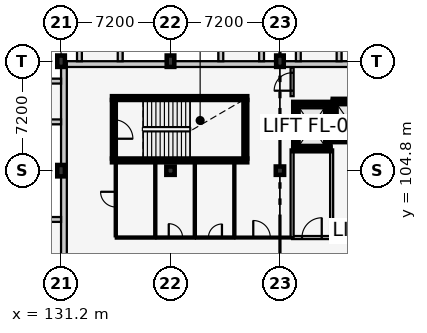
"""IFC4 building model, lengths in metres.
Left out: names, types, materials, properties, quantities, classifications, styles, units other than length and angle.
Written with IfcOpenShell. Run it as: python <this file> out.ifc"""

import sys

from ifc_helpers import new_model, si_unit, direction, frame, frame_2d, origin, origin_2d, place, context, subcontext, project, spatial, rectangle, extrude, element, fill, save


model = new_model("IFC4")
c1 = context("Model", 3, precision=1e-05, world=origin(), true_north=direction((0.0, 1.0)))
c2 = subcontext(c1, "Body", "Model", "MODEL_VIEW")
j1 = project(units=[si_unit("LENGTHUNIT", "METRE"), si_unit("PLANEANGLEUNIT", "RADIAN")], contexts=[c1])
p1 = place(None, origin())
s1 = spatial("IfcSite", under=j1, at=p1, CompositionType="ELEMENT")
p2 = place(p1, origin())
s2 = spatial("IfcBuilding", under=s1, at=p2, CompositionType="ELEMENT")
p3 = place(p2, frame((0.0, 0.0, 21.9)))
s3 = spatial("IfcBuildingStorey", under=s2, at=p3, CompositionType="ELEMENT", Elevation=21.9)
for number, where, z_axis, x_axis in (
    (1, (131.2, 104.8, 0.0), (0.0, 0.0, 1.0), (1.0, 0.0, 0.0)),
    (2, (131.2, 112.0, 0.0), (0.0, 0.0, 1.0), (1.0, 0.0, 0.0)),
):
    element("IfcColumn", number, at=place(p3, frame(where, z_axis=z_axis, x_axis=x_axis)), inside=s3, PredefinedType="COLUMN", context=c2, shape_type="SweptSolid", body=[
        extrude(rectangle(XDim=0.5, YDim=0.75, at=origin_2d()), origin(), (0.0, 0.0, 1.0), 3.9),
    ])
p4 = place(p3, frame((138.4, 104.8, 0.0), z_axis=(0.0, 0.0, 1.0), x_axis=(1.0, 0.0, 0.0)))
e3 = element("IfcColumn", 3, at=p4, inside=s3, PredefinedType="COLUMN", context=c2, shape_type="SweptSolid", body=[
    extrude(rectangle(XDim=0.55, YDim=0.55, at=origin_2d()), origin(), (0.0, 0.0, 1.0), 3.9),
])
p5 = place(p3, frame((138.4, 112.0, 0.0), z_axis=(0.0, 0.0, 1.0), x_axis=(1.0, 0.0, 0.0)))
e4 = element("IfcColumn", 4, at=p5, inside=s3, PredefinedType="COLUMN", context=c2, shape_type="SweptSolid", body=[
    extrude(rectangle(XDim=0.5, YDim=0.75, at=origin_2d()), origin(), (0.0, 0.0, 1.0), 3.9),
])
p6 = place(p3, frame((145.6, 104.8, 0.0), z_axis=(0.0, 0.0, 1.0), x_axis=(1.0, 0.0, 0.0)))
e5 = element("IfcColumn", 5, at=p6, inside=s3, PredefinedType="COLUMN", context=c2, shape_type="SweptSolid", body=[
    extrude(rectangle(XDim=0.55, YDim=0.55, at=origin_2d()), origin(), (0.0, 0.0, 1.0), 3.9),
])
p7 = place(p3, frame((145.6, 112.0, 0.0), z_axis=(0.0, 0.0, 1.0), x_axis=(1.0, 0.0, 0.0)))
e6 = element("IfcColumn", 6, at=p7, inside=s3, PredefinedType="COLUMN", context=c2, shape_type="SweptSolid", body=[
    extrude(rectangle(XDim=0.5, YDim=0.75, at=origin_2d()), origin(), (0.0, 0.0, 1.0), 3.9),
])
p8 = place(p3, frame((131.2, 111.81, 0.0), z_axis=(0.0, 0.0, 1.0), x_axis=(1.0, 0.0, 0.0)))
e7 = element("IfcWall", 7, at=p8, inside=s3, PredefinedType="SOLIDWALL", context=c2, shape_type="SweptSolid", body=[
    extrude(rectangle(XDim=28.8, YDim=0.38, at=frame_2d((14.4, 0.0))), origin(), (0.0, 0.0, 1.0), 2.955),
])
p9 = place(p3, frame((132.41, 112.0, 0.0), z_axis=(0.0, 0.0, 1.0), x_axis=(0.0, 1.0, 0.0)))
e8 = element("IfcWall", 8, at=p9, inside=s3, PredefinedType="SOLIDWALL", context=c2, shape_type="SweptSolid", body=[
    extrude(rectangle(XDim=1.793, YDim=0.32, at=frame_2d((0.896, 0.0))), origin(), (0.0, 0.0, 1.0), 3.64),
])
for number, where, z_axis, x_axis in (
    (9, (135.09, 112.0, 0.0), (0.0, 0.0, 1.0), (0.0, 1.0, 0.0)),
    (10, (141.71, 112.0, 0.0), (0.0, 0.0, 1.0), (0.0, 1.0, 0.0)),
):
    element("IfcWall", number, at=place(p3, frame(where, z_axis=z_axis, x_axis=x_axis)), inside=s3, PredefinedType="SOLIDWALL", context=c2, shape_type="SweptSolid", body=[
        extrude(rectangle(XDim=1.35, YDim=0.32, at=frame_2d((0.675, 0.0))), origin(), (0.0, 0.0, 1.0), 3.64),
    ])
for number, where, z_axis, x_axis in (
    (11, (144.39, 112.0, 0.0), (0.0, 0.0, 1.0), (0.0, 1.0, 0.0)),
    (12, (146.81, 112.0, 0.0), (0.0, 0.0, 1.0), (0.0, 1.0, 0.0)),
):
    element("IfcWall", number, at=place(p3, frame(where, z_axis=z_axis, x_axis=x_axis)), inside=s3, PredefinedType="SOLIDWALL", context=c2, shape_type="SweptSolid", body=[
        extrude(rectangle(XDim=1.793, YDim=0.32, at=frame_2d((0.896, 0.0))), origin(), (0.0, 0.0, 1.0), 3.64),
    ])
p10 = place(p3, frame((149.49, 112.0, 0.0), z_axis=(0.0, 0.0, 1.0), x_axis=(0.0, 1.0, 0.0)))
e13 = element("IfcWall", 13, at=p10, inside=s3, PredefinedType="SOLIDWALL", context=c2, shape_type="SweptSolid", body=[
    extrude(rectangle(XDim=1.35, YDim=0.32, at=frame_2d((0.675, 0.0))), origin(), (0.0, 0.0, 1.0), 3.64),
])
p11 = place(p3, frame((131.39, 83.2, 0.0), z_axis=(0.0, 0.0, 1.0), x_axis=(0.0, 1.0, 0.0)))
e14 = element("IfcWall", 14, at=p11, inside=s3, PredefinedType="SOLIDWALL", context=c2, shape_type="SweptSolid", body=[
    extrude(rectangle(XDim=28.8, YDim=0.38, at=frame_2d((14.4, 0.0))), origin(), (0.0, 0.0, 1.0), 2.915),
])
for number, where, z_axis, x_axis in (
    (15, (131.2, 101.59, 0.0), (0.0, 0.0, 1.0), (-1.0, 0.0, 0.0)),
    (16, (131.2, 108.01, 0.0), (0.0, 0.0, 1.0), (-1.0, 0.0, 0.0)),
):
    element("IfcWall", number, at=place(p3, frame(where, z_axis=z_axis, x_axis=x_axis)), inside=s3, PredefinedType="SOLIDWALL", context=c2, shape_type="SweptSolid", body=[
        extrude(rectangle(XDim=1.35, YDim=0.32, at=frame_2d((0.675, 0.0))), origin(), (0.0, 0.0, 1.0), 3.64),
    ])
p12 = place(p3, frame((131.2, 110.69, 0.0), z_axis=(0.0, 0.0, 1.0), x_axis=(-1.0, 0.0, 0.0)))
e17 = element("IfcWall", 17, at=p12, inside=s3, PredefinedType="SOLIDWALL", context=c2, shape_type="SweptSolid", body=[
    extrude(rectangle(XDim=1.793, YDim=0.32, at=frame_2d((0.896, 0.0))), origin(), (0.0, 0.0, 1.0), 3.64),
])
for number, where, z_axis, x_axis in (
    (18, (134.55, 105.475, 0.0), (0.0, 0.0, 1.0), (1.0, 0.0, 0.0)),
    (19, (143.45, 109.575, 0.0), (0.0, 0.0, 1.0), (-1.0, 0.0, 0.0)),
):
    element("IfcWall", number, at=place(p3, frame(where, z_axis=z_axis, x_axis=x_axis)), inside=s3, PredefinedType="SHEAR", context=c2, shape_type="SweptSolid", body=[
        extrude(rectangle(XDim=8.9, YDim=0.25, at=frame_2d((4.45, 0.0))), origin(), (0.0, 0.0, 1.0), 3.66),
    ])
p13 = place(p3, frame((134.675, 109.45, 0.0), z_axis=(0.0, 0.0, 1.0), x_axis=(0.0, -1.0, 0.0)))
e20 = element("IfcWall", 20, at=p13, inside=s3, PredefinedType="SHEAR", context=c2, shape_type="SweptSolid", body=[
    extrude(rectangle(XDim=3.85, YDim=0.25, at=frame_2d((1.925, 0.0))), origin(), (0.0, 0.0, 1.0), 3.66),
])
p14 = place(p13, frame((1.3, 0.0, 0.0)))
e21 = element("IfcOpeningElement", 21, at=p14, cuts=e20, PredefinedType="OPENING", context=c2, shape_type="SweptSolid", body=[
    extrude(rectangle(XDim=1.25, YDim=2.15, at=frame_2d((0.625, 1.075))), frame((0.0, 0.137, 0.0), z_axis=(0.0, -1.0, 0.0), x_axis=(1.0, 0.0, 0.0)), (0.0, 0.0, 1.0), 0.274),
])
p15 = place(p3, frame((143.325, 105.6, 0.0), z_axis=(0.0, 0.0, 1.0), x_axis=(0.0, 1.0, 0.0)))
e22 = element("IfcWall", 22, at=p15, inside=s3, PredefinedType="SHEAR", context=c2, shape_type="SweptSolid", body=[
    extrude(rectangle(XDim=3.85, YDim=0.25, at=frame_2d((1.925, 0.0))), origin(), (0.0, 0.0, 1.0), 3.66),
])
p16 = place(p3, frame((146.475, 106.2, 0.0), z_axis=(0.0, 0.0, 1.0), x_axis=(1.0, 0.0, 0.0)))
e23 = element("IfcWall", 23, at=p16, inside=s3, PredefinedType="SHEAR", context=c2, shape_type="SweptSolid", body=[
    extrude(rectangle(XDim=2.45, YDim=0.25, at=frame_2d((1.225, 0.0))), origin(), (0.0, 0.0, 1.0), 3.66),
])
p17 = place(p16, frame((0.675, 0.0, 0.0)))
e24 = element("IfcOpeningElement", 24, at=p17, cuts=e23, PredefinedType="OPENING", context=c2, shape_type="SweptSolid", body=[
    extrude(rectangle(XDim=1.1, YDim=2.15, at=frame_2d((0.55, 1.075))), frame((0.0, 0.137, 0.0), z_axis=(0.0, -1.0, 0.0), x_axis=(1.0, 0.0, 0.0)), (0.0, 0.0, 1.0), 0.274),
])
p18 = place(p3, frame((148.925, 109.2, 0.0), z_axis=(0.0, 0.0, 1.0), x_axis=(-1.0, 0.0, 0.0)))
e25 = element("IfcWall", 25, at=p18, inside=s3, PredefinedType="SHEAR", context=c2, shape_type="SweptSolid", body=[
    extrude(rectangle(XDim=2.45, YDim=0.25, at=frame_2d((1.225, 0.0))), origin(), (0.0, 0.0, 1.0), 3.66),
])
for number, where, z_axis, x_axis in (
    (26, (146.6, 109.2, 0.0), (0.0, 0.0, 1.0), (0.0, -1.0, 0.0)),
    (27, (148.8, 106.2, 0.0), (0.0, 0.0, 1.0), (0.0, 1.0, 0.0)),
):
    element("IfcWall", number, at=place(p3, frame(where, z_axis=z_axis, x_axis=x_axis)), inside=s3, PredefinedType="SHEAR", context=c2, shape_type="SweptSolid", body=[
        extrude(rectangle(XDim=3.0, YDim=0.25, at=frame_2d((1.5, 0.0))), origin(), (0.0, 0.0, 1.0), 3.66),
    ])
p19 = place(p3, frame((146.4, 100.4, 0.0), z_axis=(0.0, 0.0, 1.0), x_axis=(1.0, 0.0, 0.0)))
e28 = element("IfcWall", 28, at=p19, inside=s3, PredefinedType="PARTITIONING", context=c2, shape_type="SweptSolid", body=[
    extrude(rectangle(XDim=2.6, YDim=0.2, at=frame_2d((1.3, 0.0))), origin(), (0.0, 0.0, 1.0), 3.66),
])
p20 = place(p19, frame((0.65, 0.0, 0.0)))
e29 = element("IfcOpeningElement", 29, at=p20, cuts=e28, PredefinedType="OPENING", context=c2, shape_type="SweptSolid", body=[
    extrude(rectangle(XDim=1.3, YDim=2.2, at=frame_2d((0.65, 1.1))), frame((0.0, 0.112, 0.0), z_axis=(0.0, -1.0, 0.0), x_axis=(1.0, 0.0, 0.0)), (0.0, 0.0, 1.0), 0.224),
])
p21 = place(p3, frame((146.4, 106.2, 0.0), z_axis=(0.0, 0.0, 1.0), x_axis=(0.0, -1.0, 0.0)))
e30 = element("IfcWall", 30, at=p21, inside=s3, PredefinedType="PARTITIONING", context=c2, shape_type="SweptSolid", body=[
    extrude(rectangle(XDim=5.8, YDim=0.2, at=frame_2d((2.9, 0.0))), origin(), (0.0, 0.0, 1.0), 3.66),
])
p22 = place(p3, frame((149.0, 100.4, 0.0), z_axis=(0.0, 0.0, 1.0), x_axis=(0.0, 1.0, 0.0)))
e31 = element("IfcWall", 31, at=p22, inside=s3, PredefinedType="PARTITIONING", context=c2, shape_type="SweptSolid", body=[
    extrude(rectangle(XDim=5.8, YDim=0.2, at=frame_2d((2.9, 0.0))), origin(), (0.0, 0.0, 1.0), 3.335),
])
p23 = place(p3, frame((149.075, 106.8, 0.0), z_axis=(0.0, 0.0, 1.0), x_axis=(1.0, 0.0, 0.0)))
e32 = element("IfcWall", 32, at=p23, inside=s3, PredefinedType="SHEAR", context=c2, shape_type="SweptSolid", body=[
    extrude(rectangle(XDim=2.05, YDim=0.25, at=frame_2d((1.025, 0.0))), origin(), (0.0, 0.0, 1.0), 3.66),
])
p24 = place(p23, frame((0.525, 0.0, 0.0)))
e33 = element("IfcOpeningElement", 33, at=p24, cuts=e32, PredefinedType="OPENING", context=c2, shape_type="SweptSolid", body=[
    extrude(rectangle(XDim=1.0, YDim=2.15, at=frame_2d((0.5, 1.075))), frame((0.0, 0.137, 0.0), z_axis=(0.0, -1.0, 0.0), x_axis=(1.0, 0.0, 0.0)), (0.0, 0.0, 1.0), 0.274),
])
p25 = place(p3, frame((151.125, 109.4, 0.0), z_axis=(0.0, 0.0, 1.0), x_axis=(-1.0, 0.0, 0.0)))
e34 = element("IfcWall", 34, at=p25, inside=s3, PredefinedType="SHEAR", context=c2, shape_type="SweptSolid", body=[
    extrude(rectangle(XDim=2.05, YDim=0.25, at=frame_2d((1.025, 0.0))), origin(), (0.0, 0.0, 1.0), 3.66),
])
p26 = place(p3, frame((149.2, 109.4, 0.0), z_axis=(0.0, 0.0, 1.0), x_axis=(0.0, -1.0, 0.0)))
e35 = element("IfcWall", 35, at=p26, inside=s3, PredefinedType="SHEAR", context=c2, shape_type="SweptSolid", body=[
    extrude(rectangle(XDim=2.6, YDim=0.25, at=frame_2d((1.3, 0.0))), origin(), (0.0, 0.0, 1.0), 3.66),
])
p27 = place(p3, frame((134.8, 100.4, 0.0), z_axis=(0.0, 0.0, 1.0), x_axis=(1.0, 0.0, 0.0)))
e36 = element("IfcWall", 36, at=p27, inside=s3, PredefinedType="PARTITIONING", context=c2, shape_type="SweptSolid", body=[
    extrude(rectangle(XDim=2.6, YDim=0.14, at=frame_2d((1.3, 0.0))), origin(), (0.0, 0.0, 1.0), 3.66),
])
p28 = place(p3, frame((134.8, 100.48, 0.0), z_axis=(0.0, 0.0, 1.0), x_axis=(0.0, 1.0, 0.0)))
e37 = element("IfcWall", 37, at=p28, inside=s3, PredefinedType="PARTITIONING", context=c2, shape_type="SweptSolid", body=[
    extrude(rectangle(XDim=4.86, YDim=0.14, at=frame_2d((2.43, 0.0))), origin(), (0.0, 0.0, 1.0), 3.275),
])
p29 = place(p28, frame((1.93, 0.0, 0.0)))
e38 = element("IfcOpeningElement", 38, at=p29, cuts=e37, PredefinedType="OPENING", context=c2, shape_type="SweptSolid", body=[
    extrude(rectangle(XDim=1.0, YDim=2.1, at=frame_2d((0.5, 1.05))), frame((0.0, 0.082, 0.0), z_axis=(0.0, -1.0, 0.0), x_axis=(1.0, 0.0, 0.0)), (0.0, 0.0, 1.0), 0.164),
])
p30 = place(p3, frame((137.4, 100.48, 0.0), z_axis=(0.0, 0.0, 1.0), x_axis=(0.0, 1.0, 0.0)))
e39 = element("IfcWall", 39, at=p30, inside=s3, PredefinedType="PARTITIONING", context=c2, shape_type="SweptSolid", body=[
    extrude(rectangle(XDim=4.86, YDim=0.14, at=frame_2d((2.43, 0.0))), origin(), (0.0, 0.0, 1.0), 3.66),
])
p31 = place(p3, frame((137.48, 100.4, 0.0), z_axis=(0.0, 0.0, 1.0), x_axis=(1.0, 0.0, 0.0)))
e40 = element("IfcWall", 40, at=p31, inside=s3, PredefinedType="PARTITIONING", context=c2, shape_type="SweptSolid", body=[
    extrude(rectangle(XDim=2.52, YDim=0.14, at=frame_2d((1.26, 0.0))), origin(), (0.0, 0.0, 1.0), 3.66),
])
p32 = place(p31, frame((0.805, 0.0, 0.0)))
e41 = element("IfcOpeningElement", 41, at=p32, cuts=e40, PredefinedType="OPENING", context=c2, shape_type="SweptSolid", body=[
    extrude(rectangle(XDim=0.91, YDim=2.06, at=frame_2d((0.455, 1.03))), frame((0.0, 0.082, 0.0), z_axis=(0.0, -1.0, 0.0), x_axis=(1.0, 0.0, 0.0)), (0.0, 0.0, 1.0), 0.164),
])
p33 = place(p3, frame((140.0, 100.48, 0.0), z_axis=(0.0, 0.0, 1.0), x_axis=(0.0, 1.0, 0.0)))
e42 = element("IfcWall", 42, at=p33, inside=s3, PredefinedType="PARTITIONING", context=c2, shape_type="SweptSolid", body=[
    extrude(rectangle(XDim=4.86, YDim=0.14, at=frame_2d((2.43, 0.0))), origin(), (0.0, 0.0, 1.0), 3.66),
])
p34 = place(p3, frame((140.08, 100.4, 0.0), z_axis=(0.0, 0.0, 1.0), x_axis=(1.0, 0.0, 0.0)))
e43 = element("IfcWall", 43, at=p34, inside=s3, PredefinedType="PARTITIONING", context=c2, shape_type="SweptSolid", body=[
    extrude(rectangle(XDim=2.52, YDim=0.14, at=frame_2d((1.26, 0.0))), origin(), (0.0, 0.0, 1.0), 3.66),
])
p35 = place(p34, frame((0.815, 0.0, 0.0)))
e44 = element("IfcOpeningElement", 44, at=p35, cuts=e43, PredefinedType="OPENING", context=c2, shape_type="SweptSolid", body=[
    extrude(rectangle(XDim=0.89, YDim=2.05, at=frame_2d((0.445, 1.025))), frame((0.0, 0.082, 0.0), z_axis=(0.0, -1.0, 0.0), x_axis=(1.0, 0.0, 0.0)), (0.0, 0.0, 1.0), 0.164),
])
p36 = place(p3, frame((142.6, 100.48, 0.0), z_axis=(0.0, 0.0, 1.0), x_axis=(0.0, 1.0, 0.0)))
e45 = element("IfcWall", 45, at=p36, inside=s3, PredefinedType="PARTITIONING", context=c2, shape_type="SweptSolid", body=[
    extrude(rectangle(XDim=4.86, YDim=0.14, at=frame_2d((2.43, 0.0))), origin(), (0.0, 0.0, 1.0), 3.66),
])
p37 = place(p3, frame((142.68, 100.4, 0.0), z_axis=(0.0, 0.0, 1.0), x_axis=(1.0, 0.0, 0.0)))
e46 = element("IfcWall", 46, at=p37, inside=s3, PredefinedType="PARTITIONING", context=c2, shape_type="SweptSolid", body=[
    extrude(rectangle(XDim=3.61, YDim=0.125, at=frame_2d((1.805, 0.0))), origin(), (0.0, 0.0, 1.0), 3.66),
])
p38 = place(p37, frame((1.165, 0.0, 0.0)))
e47 = element("IfcOpeningElement", 47, at=p38, cuts=e46, PredefinedType="OPENING", context=c2, shape_type="SweptSolid", body=[
    extrude(rectangle(XDim=1.12, YDim=2.15, at=frame_2d((0.56, 1.075))), frame((0.0, 0.074, 0.0), z_axis=(0.0, -1.0, 0.0), x_axis=(1.0, 0.0, 0.0)), (0.0, 0.0, 1.0), 0.149),
])
p39 = place(p3, frame((146.4, 109.7, 0.0), z_axis=(0.0, 0.0, 1.0), x_axis=(0.0, 1.0, 0.0)))
e48 = element("IfcWall", 48, at=p39, inside=s3, PredefinedType="PARTITIONING", context=c2, shape_type="SweptSolid", body=[
    extrude(rectangle(XDim=1.9, YDim=0.2, at=frame_2d((0.95, 0.0))), origin(), (0.0, 0.0, 1.0), 3.66),
])
p40 = place(p39, frame((0.36, 0.0, 0.0)))
e49 = element("IfcOpeningElement", 49, at=p40, cuts=e48, PredefinedType="OPENING", context=c2, shape_type="SweptSolid", body=[
    extrude(rectangle(XDim=1.18, YDim=2.2, at=frame_2d((0.59, 1.1))), frame((0.0, 0.112, 0.0), z_axis=(0.0, -1.0, 0.0), x_axis=(1.0, 0.0, 0.0)), (0.0, 0.0, 1.0), 0.224),
])
p41 = place(p14, origin())
e50 = element("IfcDoor", 50, at=p41, inside=s3, OperationType="SINGLE_SWING_RIGHT", PredefinedType="DOOR", context=c2, shape_type="SweptSolid", body=[
    extrude(rectangle(XDim=1.25, YDim=2.15, at=frame_2d((0.625, 1.075))), frame((0.0, 0.025, 0.0), z_axis=(0.0, -1.0, 0.0), x_axis=(1.0, 0.0, 0.0)), (0.0, 0.0, 1.0), 0.05),
])
fill(e21, e50)
p42 = place(p17, origin())
e51 = element("IfcDoor", 51, at=p42, inside=s3, OperationType="SLIDING_TO_LEFT", PredefinedType="DOOR", context=c2, shape_type="SweptSolid", body=[
    extrude(rectangle(XDim=1.1, YDim=2.15, at=frame_2d((0.55, 1.075))), frame((0.0, 0.025, 0.0), z_axis=(0.0, -1.0, 0.0), x_axis=(1.0, 0.0, 0.0)), (0.0, 0.0, 1.0), 0.05),
])
fill(e24, e51)
p43 = place(p20, origin())
e52 = element("IfcDoor", 52, at=p43, inside=s3, OperationType="SINGLE_SWING_RIGHT", PredefinedType="DOOR", context=c2, shape_type="SweptSolid", body=[
    extrude(rectangle(XDim=1.3, YDim=2.2, at=frame_2d((0.65, 1.1))), frame((0.0, 0.025, 0.0), z_axis=(0.0, -1.0, 0.0), x_axis=(1.0, 0.0, 0.0)), (0.0, 0.0, 1.0), 0.05),
])
fill(e29, e52)
p44 = place(p24, origin())
e53 = element("IfcDoor", 53, at=p44, inside=s3, OperationType="SLIDING_TO_LEFT", PredefinedType="DOOR", context=c2, shape_type="SweptSolid", body=[
    extrude(rectangle(XDim=1.0, YDim=2.15, at=frame_2d((0.5, 1.075))), frame((0.0, 0.025, 0.0), z_axis=(0.0, -1.0, 0.0), x_axis=(1.0, 0.0, 0.0)), (0.0, 0.0, 1.0), 0.05),
])
fill(e33, e53)
p45 = place(p29, origin())
e54 = element("IfcDoor", 54, at=p45, inside=s3, OperationType="SINGLE_SWING_RIGHT", PredefinedType="DOOR", context=c2, shape_type="SweptSolid", body=[
    extrude(rectangle(XDim=1.0, YDim=2.1, at=frame_2d((0.5, 1.05))), frame((0.0, 0.025, 0.0), z_axis=(0.0, -1.0, 0.0), x_axis=(1.0, 0.0, 0.0)), (0.0, 0.0, 1.0), 0.05),
])
fill(e38, e54)
p46 = place(p32, origin())
e55 = element("IfcDoor", 55, at=p46, inside=s3, OperationType="SINGLE_SWING_LEFT", PredefinedType="DOOR", context=c2, shape_type="SweptSolid", body=[
    extrude(rectangle(XDim=0.91, YDim=2.06, at=frame_2d((0.455, 1.03))), frame((0.0, 0.025, 0.0), z_axis=(0.0, -1.0, 0.0), x_axis=(1.0, 0.0, 0.0)), (0.0, 0.0, 1.0), 0.05),
])
fill(e41, e55)
p47 = place(p35, origin())
e56 = element("IfcDoor", 56, at=p47, inside=s3, OperationType="SINGLE_SWING_RIGHT", PredefinedType="DOOR", context=c2, shape_type="SweptSolid", body=[
    extrude(rectangle(XDim=0.89, YDim=2.05, at=frame_2d((0.445, 1.025))), frame((0.0, 0.025, 0.0), z_axis=(0.0, -1.0, 0.0), x_axis=(1.0, 0.0, 0.0)), (0.0, 0.0, 1.0), 0.05),
])
fill(e44, e56)
p48 = place(p38, origin())
e57 = element("IfcDoor", 57, at=p48, inside=s3, OperationType="SINGLE_SWING_LEFT", PredefinedType="DOOR", context=c2, shape_type="SweptSolid", body=[
    extrude(rectangle(XDim=1.12, YDim=2.15, at=frame_2d((0.56, 1.075))), frame((0.0, 0.025, 0.0), z_axis=(0.0, -1.0, 0.0), x_axis=(1.0, 0.0, 0.0)), (0.0, 0.0, 1.0), 0.05),
])
fill(e47, e57)
p49 = place(p40, origin())
e58 = element("IfcDoor", 58, at=p49, inside=s3, OperationType="SINGLE_SWING_LEFT", PredefinedType="DOOR", context=c2, shape_type="SweptSolid", body=[
    extrude(rectangle(XDim=1.18, YDim=2.2, at=frame_2d((0.59, 1.1))), frame((0.0, 0.025, 0.0), z_axis=(0.0, -1.0, 0.0), x_axis=(1.0, 0.0, 0.0)), (0.0, 0.0, 1.0), 0.05),
])
fill(e49, e58)
save(model, sys.argv[1])
